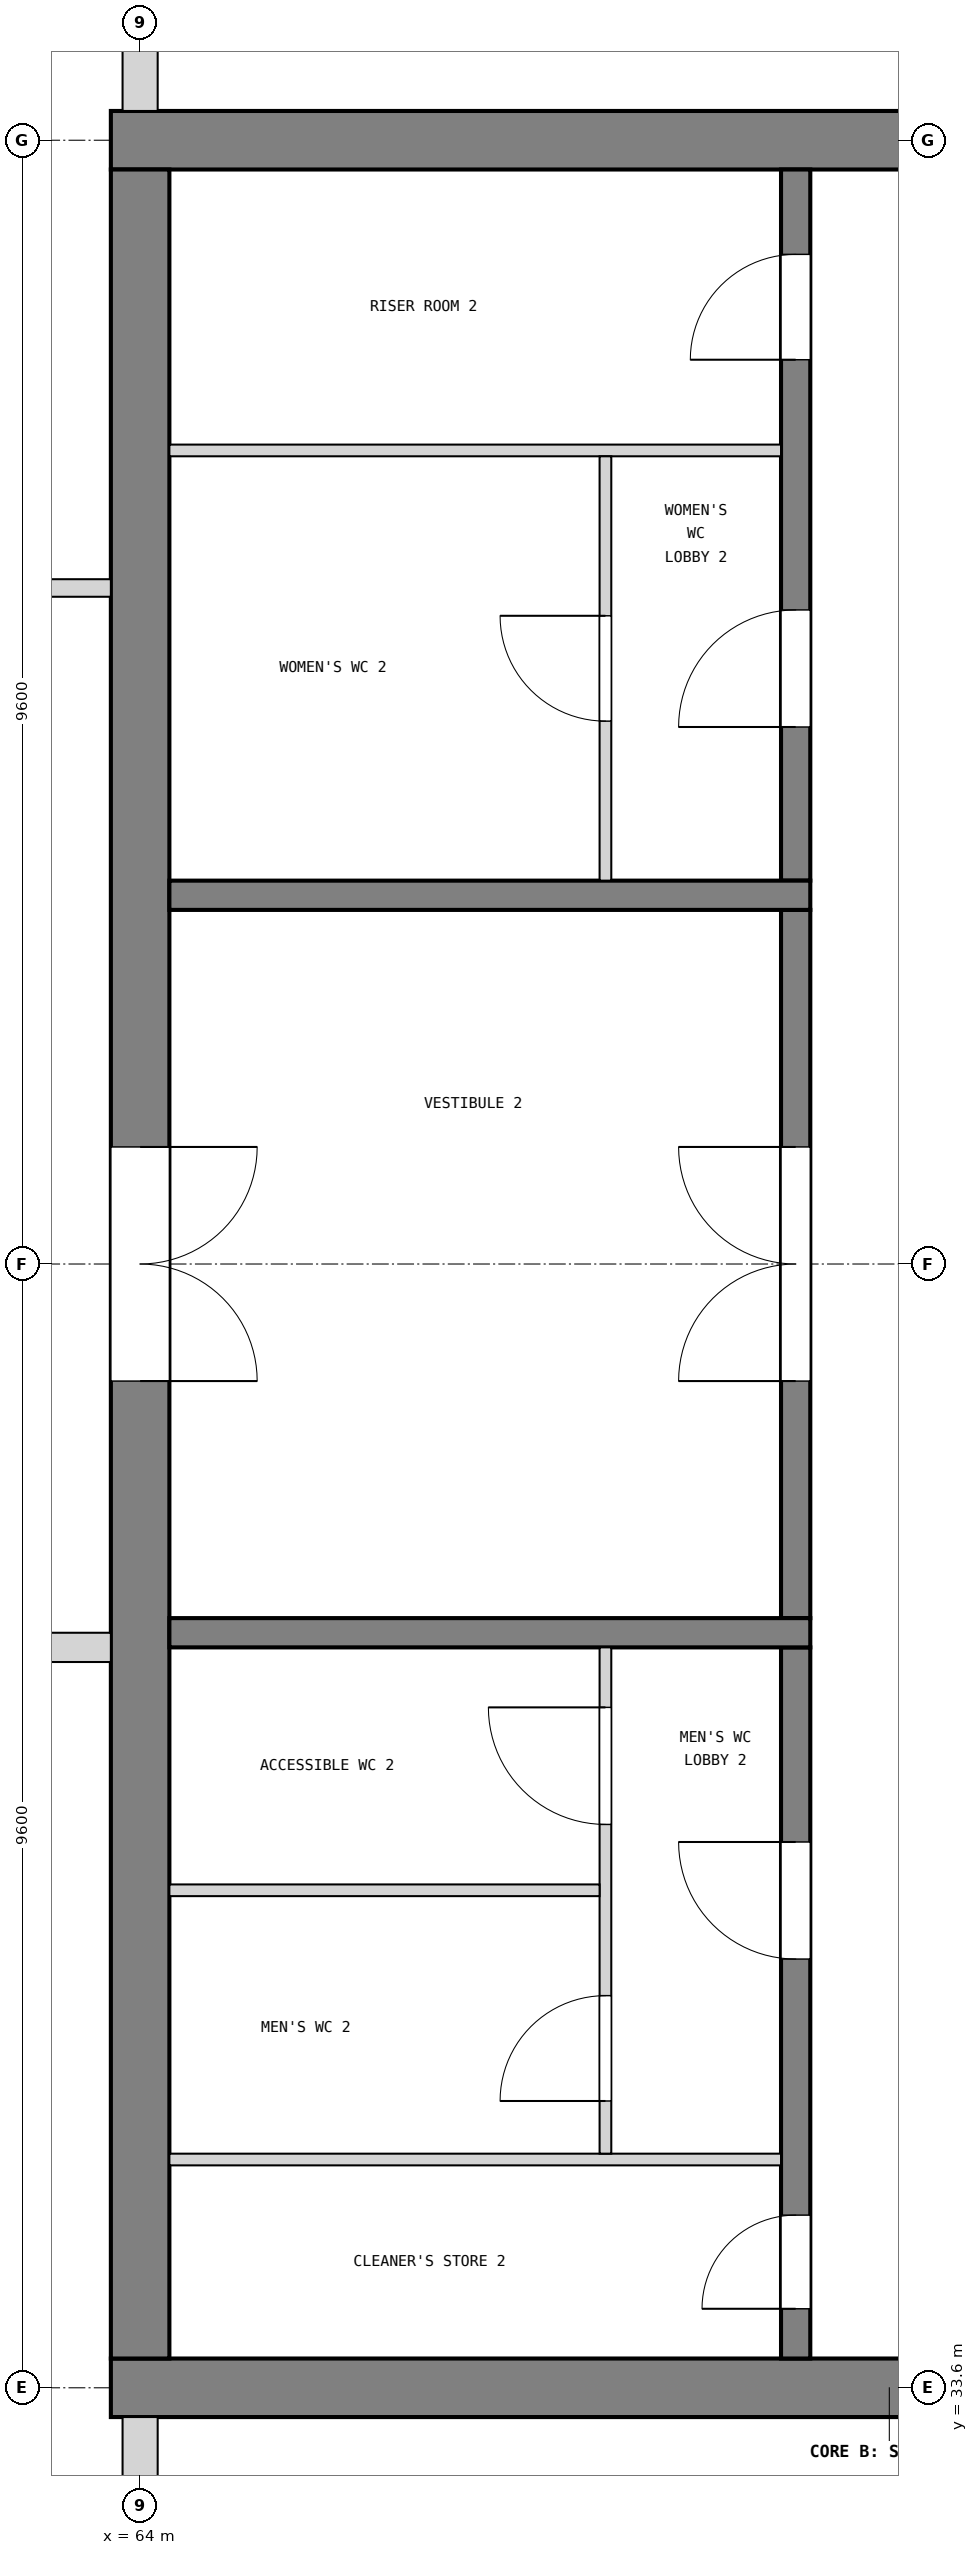
"""IFC4 building model, lengths in metres.
Left out: names, types, materials, properties, quantities, classifications, styles, units other than length and angle.
Written with IfcOpenShell. Run it as: python <this file> out.ifc"""

import sys

from ifc_helpers import new_model, si_unit, direction, frame, frame_2d, origin, place, context, subcontext, project, spatial, rectangle, extrude, element, fill, save


model = new_model("IFC4")
c1 = context("Model", 3, precision=1e-05, world=origin(), true_north=direction((0.0, 1.0)))
c2 = subcontext(c1, "Body", "Model", "MODEL_VIEW")
j1 = project(units=[si_unit("LENGTHUNIT", "METRE"), si_unit("PLANEANGLEUNIT", "RADIAN")], contexts=[c1])
p1 = place(None, origin())
s1 = spatial("IfcSite", under=j1, at=p1, CompositionType="ELEMENT")
p2 = place(p1, origin())
s2 = spatial("IfcBuilding", under=s1, at=p2, CompositionType="ELEMENT")
p3 = place(p2, frame((0.0, 0.0, 17.1)))
s3 = spatial("IfcBuildingStorey", under=s2, at=p3, CompositionType="ELEMENT", Elevation=17.1)
p4 = place(p3, frame((63.75, 52.8, 0.0), z_axis=(0.0, 0.0, 1.0), x_axis=(1.0, 0.0, 0.0)))
e1 = element("IfcWall", 1, at=p4, inside=s3, PredefinedType="SHEAR", context=c2, shape_type="SweptSolid", body=[
    extrude(rectangle(XDim=13.3, YDim=0.5, at=frame_2d((6.65, 0.0))), origin(), (0.0, 0.0, 1.0), 3.9),
])
p5 = place(p4, frame((11.05, 0.0, 1.0)))
e2 = element("IfcOpeningElement", 2, at=p5, cuts=e1, PredefinedType="OPENING", context=c2, shape_type="SweptSolid", body=[
    extrude(rectangle(XDim=0.4, YDim=2.0, at=frame_2d((0.2, 1.0))), frame((0.0, 0.26, 0.0), z_axis=(0.0, -1.0, 0.0), x_axis=(1.0, 0.0, 0.0)), (0.0, 0.0, 1.0), 0.52),
])
p6 = place(p3, frame((63.75, 33.6, 0.0), z_axis=(0.0, 0.0, 1.0), x_axis=(1.0, 0.0, 0.0)))
e3 = element("IfcWall", 3, at=p6, inside=s3, PredefinedType="SHEAR", context=c2, shape_type="SweptSolid", body=[
    extrude(rectangle(XDim=13.3, YDim=0.5, at=frame_2d((6.65, 0.0))), origin(), (0.0, 0.0, 1.0), 3.9),
])
p7 = place(p6, frame((11.05, 0.0, 1.0)))
e4 = element("IfcOpeningElement", 4, at=p7, cuts=e3, PredefinedType="OPENING", context=c2, shape_type="SweptSolid", body=[
    extrude(rectangle(XDim=0.4, YDim=2.0, at=frame_2d((0.2, 1.0))), frame((0.0, 0.26, 0.0), z_axis=(0.0, -1.0, 0.0), x_axis=(1.0, 0.0, 0.0)), (0.0, 0.0, 1.0), 0.52),
])
p8 = place(p3, frame((64.0, 33.85, 0.0), z_axis=(0.0, 0.0, 1.0), x_axis=(0.0, 1.0, 0.0)))
e5 = element("IfcWall", 5, at=p8, inside=s3, PredefinedType="SHEAR", context=c2, shape_type="SweptSolid", body=[
    extrude(rectangle(XDim=18.7, YDim=0.5, at=frame_2d((9.35, 0.0))), origin(), (0.0, 0.0, 1.0), 3.9),
])
p9 = place(p8, frame((8.35, 0.0, 0.0)))
e6 = element("IfcOpeningElement", 6, at=p9, cuts=e5, PredefinedType="OPENING", context=c2, shape_type="SweptSolid", body=[
    extrude(rectangle(XDim=2.0, YDim=2.1, at=frame_2d((1.0, 1.05))), frame((0.0, 0.26, 0.0), z_axis=(0.0, -1.0, 0.0), x_axis=(1.0, 0.0, 0.0)), (0.0, 0.0, 1.0), 0.52),
])
p10 = place(p3, frame((64.0, 31.0, 0.0), z_axis=(0.0, 0.0, 1.0), x_axis=(0.0, 1.0, 0.0)))
e7 = element("IfcWall", 7, at=p10, inside=s3, PredefinedType="SOLIDWALL", context=c2, shape_type="SweptSolid", body=[
    extrude(rectangle(XDim=2.35, YDim=0.3, at=frame_2d((1.175, 0.0))), origin(), (0.0, 0.0, 1.0), 2.88),
])
p11 = place(p3, frame((64.0, 53.05, 0.0), z_axis=(0.0, 0.0, 1.0), x_axis=(0.0, 1.0, 0.0)))
e8 = element("IfcWall", 8, at=p11, inside=s3, PredefinedType="SOLIDWALL", context=c2, shape_type="SweptSolid", body=[
    extrude(rectangle(XDim=2.35, YDim=0.3, at=frame_2d((1.175, 0.0))), origin(), (0.0, 0.0, 1.0), 2.88),
])
p12 = place(p3, frame((69.6, 33.85, 0.0), z_axis=(0.0, 0.0, 1.0), x_axis=(0.0, 1.0, 0.0)))
e9 = element("IfcWall", 9, at=p12, inside=s3, PredefinedType="SOLIDWALL", context=c2, shape_type="SweptSolid", body=[
    extrude(rectangle(XDim=6.075, YDim=0.25, at=frame_2d((3.038, 0.0))), origin(), (0.0, 0.0, 1.0), 3.6),
])
p13 = place(p12, frame((0.425, 0.0, 0.0)))
e10 = element("IfcOpeningElement", 10, at=p13, cuts=e9, PredefinedType="OPENING", context=c2, shape_type="SweptSolid", body=[
    extrude(rectangle(XDim=0.8, YDim=2.1, at=frame_2d((0.4, 1.05))), frame((0.0, 0.135, 0.0), z_axis=(0.0, -1.0, 0.0), x_axis=(1.0, 0.0, 0.0)), (0.0, 0.0, 1.0), 0.27),
])
p14 = place(p12, frame((3.413, 0.0, 0.0)))
e11 = element("IfcOpeningElement", 11, at=p14, cuts=e9, PredefinedType="OPENING", context=c2, shape_type="SweptSolid", body=[
    extrude(rectangle(XDim=1.0, YDim=2.1, at=frame_2d((0.5, 1.05))), frame((0.0, 0.135, 0.0), z_axis=(0.0, -1.0, 0.0), x_axis=(1.0, 0.0, 0.0)), (0.0, 0.0, 1.0), 0.27),
])
p15 = place(p3, frame((69.6, 40.175, 0.0), z_axis=(0.0, 0.0, 1.0), x_axis=(0.0, 1.0, 0.0)))
e12 = element("IfcWall", 12, at=p15, inside=s3, PredefinedType="SOLIDWALL", context=c2, shape_type="SweptSolid", body=[
    extrude(rectangle(XDim=6.05, YDim=0.25, at=frame_2d((3.025, 0.0))), origin(), (0.0, 0.0, 1.0), 3.6),
])
p16 = place(p15, frame((2.025, 0.0, 0.0)))
e13 = element("IfcOpeningElement", 13, at=p16, cuts=e12, PredefinedType="OPENING", context=c2, shape_type="SweptSolid", body=[
    extrude(rectangle(XDim=2.0, YDim=2.1, at=frame_2d((1.0, 1.05))), frame((0.0, 0.135, 0.0), z_axis=(0.0, -1.0, 0.0), x_axis=(1.0, 0.0, 0.0)), (0.0, 0.0, 1.0), 0.27),
])
p17 = place(p3, frame((69.6, 46.475, 0.0), z_axis=(0.0, 0.0, 1.0), x_axis=(0.0, 1.0, 0.0)))
e14 = element("IfcWall", 14, at=p17, inside=s3, PredefinedType="SOLIDWALL", context=c2, shape_type="SweptSolid", body=[
    extrude(rectangle(XDim=6.075, YDim=0.25, at=frame_2d((3.038, 0.0))), origin(), (0.0, 0.0, 1.0), 3.6),
])
p18 = place(p17, frame((1.312, 0.0, 0.0)))
e15 = element("IfcOpeningElement", 15, at=p18, cuts=e14, PredefinedType="OPENING", context=c2, shape_type="SweptSolid", body=[
    extrude(rectangle(XDim=1.0, YDim=2.1, at=frame_2d((0.5, 1.05))), frame((0.0, 0.135, 0.0), z_axis=(0.0, -1.0, 0.0), x_axis=(1.0, 0.0, 0.0)), (0.0, 0.0, 1.0), 0.27),
])
p19 = place(p17, frame((4.45, 0.0, 0.0)))
e16 = element("IfcOpeningElement", 16, at=p19, cuts=e14, PredefinedType="OPENING", context=c2, shape_type="SweptSolid", body=[
    extrude(rectangle(XDim=0.9, YDim=2.1, at=frame_2d((0.45, 1.05))), frame((0.0, 0.135, 0.0), z_axis=(0.0, -1.0, 0.0), x_axis=(1.0, 0.0, 0.0)), (0.0, 0.0, 1.0), 0.27),
])
for number, where, z_axis, x_axis in (
    (17, (69.725, 40.05, 0.0), (0.0, 0.0, 1.0), (-1.0, 0.0, 0.0)),
    (18, (69.725, 46.35, 0.0), (0.0, 0.0, 1.0), (-1.0, 0.0, 0.0)),
):
    element("IfcWall", number, at=place(p3, frame(where, z_axis=z_axis, x_axis=x_axis)), inside=s3, PredefinedType="SOLIDWALL", context=c2, shape_type="SweptSolid", body=[
        extrude(rectangle(XDim=5.475, YDim=0.25, at=frame_2d((2.738, 0.0))), origin(), (0.0, 0.0, 1.0), 3.6),
    ])
p20 = place(p3, frame((69.475, 35.55, 0.0), z_axis=(0.0, 0.0, 1.0), x_axis=(-1.0, 0.0, 0.0)))
e19 = element("IfcWall", 19, at=p20, inside=s3, PredefinedType="PARTITIONING", context=c2, shape_type="SweptSolid", body=[
    extrude(rectangle(XDim=5.225, YDim=0.1, at=frame_2d((2.613, 0.0))), origin(), (0.0, 0.0, 1.0), 3.6),
])
p21 = place(p3, frame((67.975, 35.6, 0.0), z_axis=(0.0, 0.0, 1.0), x_axis=(0.0, 1.0, 0.0)))
e20 = element("IfcWall", 20, at=p21, inside=s3, PredefinedType="PARTITIONING", context=c2, shape_type="SweptSolid", body=[
    extrude(rectangle(XDim=4.325, YDim=0.1, at=frame_2d((2.163, 0.0))), origin(), (0.0, 0.0, 1.0), 3.6),
])
p22 = place(p21, frame((0.45, 0.0, 0.0)))
e21 = element("IfcOpeningElement", 21, at=p22, cuts=e20, PredefinedType="OPENING", context=c2, shape_type="SweptSolid", body=[
    extrude(rectangle(XDim=0.9, YDim=2.1, at=frame_2d((0.45, 1.05))), frame((0.0, 0.06, 0.0), z_axis=(0.0, -1.0, 0.0), x_axis=(1.0, 0.0, 0.0)), (0.0, 0.0, 1.0), 0.12),
])
p23 = place(p21, frame((2.812, 0.0, 0.0)))
e22 = element("IfcOpeningElement", 22, at=p23, cuts=e20, PredefinedType="OPENING", context=c2, shape_type="SweptSolid", body=[
    extrude(rectangle(XDim=1.0, YDim=2.1, at=frame_2d((0.5, 1.05))), frame((0.0, 0.06, 0.0), z_axis=(0.0, -1.0, 0.0), x_axis=(1.0, 0.0, 0.0)), (0.0, 0.0, 1.0), 0.12),
])
p24 = place(p3, frame((67.925, 37.85, 0.0), z_axis=(0.0, 0.0, 1.0), x_axis=(-1.0, 0.0, 0.0)))
e23 = element("IfcWall", 23, at=p24, inside=s3, PredefinedType="PARTITIONING", context=c2, shape_type="SweptSolid", body=[
    extrude(rectangle(XDim=3.675, YDim=0.1, at=frame_2d((1.837, 0.0))), origin(), (0.0, 0.0, 1.0), 3.6),
])
p25 = place(p3, frame((69.475, 50.15, 0.0), z_axis=(0.0, 0.0, 1.0), x_axis=(-1.0, 0.0, 0.0)))
e24 = element("IfcWall", 24, at=p25, inside=s3, PredefinedType="PARTITIONING", context=c2, shape_type="SweptSolid", body=[
    extrude(rectangle(XDim=5.225, YDim=0.1, at=frame_2d((2.613, 0.0))), origin(), (0.0, 0.0, 1.0), 3.6),
])
p26 = place(p3, frame((67.975, 46.475, 0.0), z_axis=(0.0, 0.0, 1.0), x_axis=(0.0, 1.0, 0.0)))
e25 = element("IfcWall", 25, at=p26, inside=s3, PredefinedType="PARTITIONING", context=c2, shape_type="SweptSolid", body=[
    extrude(rectangle(XDim=3.625, YDim=0.1, at=frame_2d((1.812, 0.0))), origin(), (0.0, 0.0, 1.0), 3.6),
])
p27 = place(p26, frame((1.363, 0.0, 0.0)))
e26 = element("IfcOpeningElement", 26, at=p27, cuts=e25, PredefinedType="OPENING", context=c2, shape_type="SweptSolid", body=[
    extrude(rectangle(XDim=0.9, YDim=2.1, at=frame_2d((0.45, 1.05))), frame((0.0, 0.06, 0.0), z_axis=(0.0, -1.0, 0.0), x_axis=(1.0, 0.0, 0.0)), (0.0, 0.0, 1.0), 0.12),
])
p28 = place(p3, frame((54.4, 48.975, 0.0), z_axis=(0.0, 0.0, 1.0), x_axis=(1.0, 0.0, 0.0)))
e27 = element("IfcWall", 27, at=p28, inside=s3, PredefinedType="PARTITIONING", context=c2, shape_type="SweptSolid", body=[
    extrude(rectangle(XDim=9.35, YDim=0.15, at=frame_2d((4.675, 0.0))), origin(), (0.0, 0.0, 1.0), 3.68),
])
p29 = place(p28, frame((4.2, 0.0, 0.0)))
e28 = element("IfcOpeningElement", 28, at=p29, cuts=e27, PredefinedType="OPENING", context=c2, shape_type="SweptSolid", body=[
    extrude(rectangle(XDim=1.0, YDim=2.1, at=frame_2d((0.5, 1.05))), frame((0.0, 0.085, 0.0), z_axis=(0.0, -1.0, 0.0), x_axis=(1.0, 0.0, 0.0)), (0.0, 0.0, 1.0), 0.17),
])
p30 = place(p3, frame((57.78, 39.925, 0.0), z_axis=(0.0, 0.0, 1.0), x_axis=(1.0, 0.0, 0.0)))
e29 = element("IfcWall", 29, at=p30, inside=s3, PredefinedType="PARTITIONING", context=c2, shape_type="SweptSolid", body=[
    extrude(rectangle(XDim=5.97, YDim=0.25, at=frame_2d((2.985, 0.0))), origin(), (0.0, 0.0, 1.0), 3.68),
])
p31 = place(p30, frame((2.47, 0.0, 0.0)))
e30 = element("IfcOpeningElement", 30, at=p31, cuts=e29, PredefinedType="OPENING", context=c2, shape_type="SweptSolid", body=[
    extrude(rectangle(XDim=1.2, YDim=2.1, at=frame_2d((0.6, 1.05))), frame((0.0, 0.135, 0.0), z_axis=(0.0, -1.0, 0.0), x_axis=(1.0, 0.0, 0.0)), (0.0, 0.0, 1.0), 0.27),
])
p32 = place(p16, origin())
e31 = element("IfcDoor", 31, at=p32, inside=s3, OperationType="DOUBLE_DOOR_SINGLE_SWING", PredefinedType="DOOR", context=c2, shape_type="SweptSolid", body=[
    extrude(rectangle(XDim=2.0, YDim=2.1, at=frame_2d((1.0, 1.05))), frame((0.0, 0.025, 0.0), z_axis=(0.0, -1.0, 0.0), x_axis=(1.0, 0.0, 0.0)), (0.0, 0.0, 1.0), 0.05),
])
fill(e13, e31)
p33 = place(p9, frame((2.0, 0.0, 0.0), z_axis=(0.0, 0.0, 1.0), x_axis=(-1.0, 0.0, 0.0)))
e32 = element("IfcDoor", 32, at=p33, inside=s3, OperationType="DOUBLE_DOOR_SINGLE_SWING", PredefinedType="DOOR", context=c2, shape_type="SweptSolid", body=[
    extrude(rectangle(XDim=2.0, YDim=2.1, at=frame_2d((1.0, 1.05))), frame((0.0, 0.025, 0.0), z_axis=(0.0, -1.0, 0.0), x_axis=(1.0, 0.0, 0.0)), (0.0, 0.0, 1.0), 0.05),
])
fill(e6, e32)
p34 = place(p13, origin())
e33 = element("IfcDoor", 33, at=p34, inside=s3, OperationType="SINGLE_SWING_LEFT", PredefinedType="DOOR", context=c2, shape_type="SweptSolid", body=[
    extrude(rectangle(XDim=0.8, YDim=2.1, at=frame_2d((0.4, 1.05))), frame((0.0, 0.025, 0.0), z_axis=(0.0, -1.0, 0.0), x_axis=(1.0, 0.0, 0.0)), (0.0, 0.0, 1.0), 0.05),
])
fill(e10, e33)
p35 = place(p14, origin())
e34 = element("IfcDoor", 34, at=p35, inside=s3, OperationType="SINGLE_SWING_RIGHT", PredefinedType="DOOR", context=c2, shape_type="SweptSolid", body=[
    extrude(rectangle(XDim=1.0, YDim=2.1, at=frame_2d((0.5, 1.05))), frame((0.0, 0.025, 0.0), z_axis=(0.0, -1.0, 0.0), x_axis=(1.0, 0.0, 0.0)), (0.0, 0.0, 1.0), 0.05),
])
fill(e11, e34)
p36 = place(p22, origin())
e35 = element("IfcDoor", 35, at=p36, inside=s3, OperationType="SINGLE_SWING_LEFT", PredefinedType="DOOR", context=c2, shape_type="SweptSolid", body=[
    extrude(rectangle(XDim=0.9, YDim=2.1, at=frame_2d((0.45, 1.05))), frame((0.0, 0.025, 0.0), z_axis=(0.0, -1.0, 0.0), x_axis=(1.0, 0.0, 0.0)), (0.0, 0.0, 1.0), 0.05),
])
fill(e21, e35)
p37 = place(p23, origin())
e36 = element("IfcDoor", 36, at=p37, inside=s3, OperationType="SINGLE_SWING_RIGHT", PredefinedType="DOOR", context=c2, shape_type="SweptSolid", body=[
    extrude(rectangle(XDim=1.0, YDim=2.1, at=frame_2d((0.5, 1.05))), frame((0.0, 0.025, 0.0), z_axis=(0.0, -1.0, 0.0), x_axis=(1.0, 0.0, 0.0)), (0.0, 0.0, 1.0), 0.05),
])
fill(e22, e36)
p38 = place(p18, origin())
e37 = element("IfcDoor", 37, at=p38, inside=s3, OperationType="SINGLE_SWING_LEFT", PredefinedType="DOOR", context=c2, shape_type="SweptSolid", body=[
    extrude(rectangle(XDim=1.0, YDim=2.1, at=frame_2d((0.5, 1.05))), frame((0.0, 0.025, 0.0), z_axis=(0.0, -1.0, 0.0), x_axis=(1.0, 0.0, 0.0)), (0.0, 0.0, 1.0), 0.05),
])
fill(e15, e37)
p39 = place(p27, origin())
e38 = element("IfcDoor", 38, at=p39, inside=s3, OperationType="SINGLE_SWING_RIGHT", PredefinedType="DOOR", context=c2, shape_type="SweptSolid", body=[
    extrude(rectangle(XDim=0.9, YDim=2.1, at=frame_2d((0.45, 1.05))), frame((0.0, 0.025, 0.0), z_axis=(0.0, -1.0, 0.0), x_axis=(1.0, 0.0, 0.0)), (0.0, 0.0, 1.0), 0.05),
])
fill(e26, e38)
p40 = place(p19, origin())
e39 = element("IfcDoor", 39, at=p40, inside=s3, OperationType="SINGLE_SWING_LEFT", PredefinedType="DOOR", context=c2, shape_type="SweptSolid", body=[
    extrude(rectangle(XDim=0.9, YDim=2.1, at=frame_2d((0.45, 1.05))), frame((0.0, 0.025, 0.0), z_axis=(0.0, -1.0, 0.0), x_axis=(1.0, 0.0, 0.0)), (0.0, 0.0, 1.0), 0.05),
])
fill(e16, e39)
save(model, sys.argv[1])
